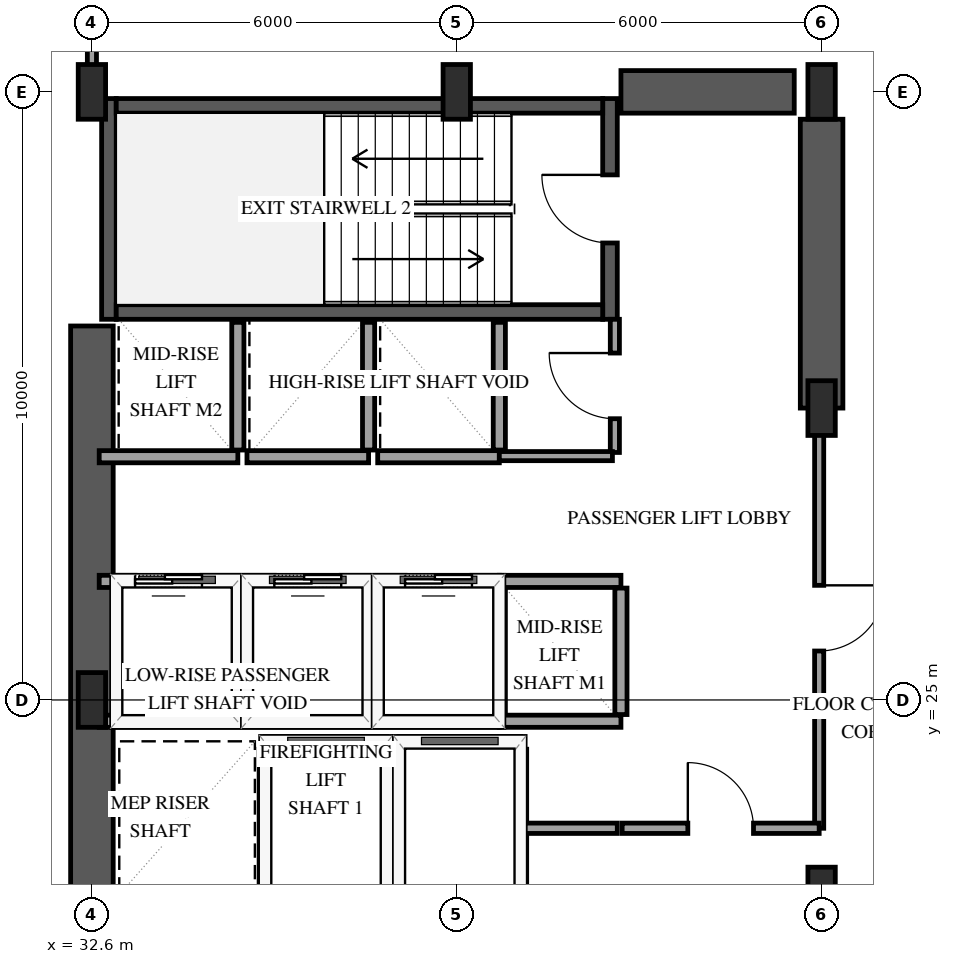
"""IFC4 building model, lengths in metres.
Left out: names, types, materials, properties, quantities, classifications, styles, units other than length and angle.
Written with IfcOpenShell. Run it as: python <this file> out.ifc"""

import sys

from ifc_helpers import new_model, si_unit, direction, frame, frame_2d, origin, origin_2d, place, context, subcontext, project, spatial, rectangle, extrude, element, fill, save


model = new_model("IFC4")
c1 = context("Model", 3, precision=1e-05, world=origin(), true_north=direction((0.0, 1.0)))
c2 = subcontext(c1, "Body", "Model", "MODEL_VIEW")
j1 = project(units=[si_unit("LENGTHUNIT", "METRE"), si_unit("PLANEANGLEUNIT", "RADIAN")], contexts=[c1])
p1 = place(None, origin())
s1 = spatial("IfcSite", under=j1, at=p1, CompositionType="ELEMENT")
p2 = place(p1, origin())
s2 = spatial("IfcBuilding", under=s1, at=p2, CompositionType="ELEMENT")
p3 = place(p2, frame((0.0, 0.0, 62.6)))
s3 = spatial("IfcBuildingStorey", under=s2, at=p3, CompositionType="ELEMENT", Elevation=62.6)
p4 = place(p3, frame((32.88, 31.26, 0.0), z_axis=(0.0, 0.0, 1.0), x_axis=(0.0, 1.0, 0.0)))
e1 = element("IfcWall", 1, at=p4, inside=s3, PredefinedType="SHEAR", context=c2, shape_type="SweptSolid", body=[
    extrude(rectangle(XDim=3.63, YDim=0.24, at=frame_2d((1.815, 0.0))), origin(), (0.0, 0.0, 1.0), 4.0),
])
p5 = place(p3, frame((41.12, 31.26, 0.0), z_axis=(0.0, 0.0, 1.0), x_axis=(0.0, 1.0, 0.0)))
e2 = element("IfcWall", 2, at=p5, inside=s3, PredefinedType="SHEAR", context=c2, shape_type="SweptSolid", body=[
    extrude(rectangle(XDim=3.63, YDim=0.24, at=frame_2d((1.815, 0.0))), origin(), (0.0, 0.0, 1.0), 4.0),
])
p6 = place(p5, frame((1.255, 0.0, 0.0)))
e3 = element("IfcOpeningElement", 3, at=p6, cuts=e2, PredefinedType="OPENING", context=c2, shape_type="SweptSolid", body=[
    extrude(rectangle(XDim=1.12, YDim=2.15, at=frame_2d((0.56, 1.075))), frame((0.0, 0.13, 0.0), z_axis=(0.0, -1.0, 0.0), x_axis=(1.0, 0.0, 0.0)), (0.0, 0.0, 1.0), 0.26),
])
for number, where, z_axis, x_axis in (
    (4, (33.0, 31.38, 0.0), (0.0, 0.0, 1.0), (1.0, 0.0, 0.0)),
    (5, (33.0, 34.77, 0.0), (0.0, 0.0, 1.0), (1.0, 0.0, 0.0)),
):
    element("IfcWall", number, at=place(p3, frame(where, z_axis=z_axis, x_axis=x_axis)), inside=s3, PredefinedType="SHEAR", context=c2, shape_type="SweptSolid", body=[
        extrude(rectangle(XDim=8.0, YDim=0.24, at=frame_2d((4.0, 0.0))), origin(), (0.0, 0.0, 1.0), 4.0),
    ])
p7 = place(p3, frame((32.6, 18.85, 0.0), z_axis=(0.0, 0.0, 1.0), x_axis=(0.0, 1.0, 0.0)))
e6 = element("IfcWall", 6, at=p7, inside=s3, PredefinedType="SHEAR", context=c2, shape_type="SweptSolid", body=[
    extrude(rectangle(XDim=12.3, YDim=0.7, at=frame_2d((6.15, 0.0))), origin(), (0.0, 0.0, 1.0), 4.0),
])
p8 = place(p3, frame((41.3, 35.0, 0.0), z_axis=(0.0, 0.0, 1.0), x_axis=(1.0, 0.0, 0.0)))
e7 = element("IfcWall", 7, at=p8, inside=s3, PredefinedType="SHEAR", context=c2, shape_type="SweptSolid", body=[
    extrude(rectangle(XDim=2.85, YDim=0.7, at=frame_2d((1.425, 0.0))), origin(), (0.0, 0.0, 1.0), 4.0),
])
p9 = place(p3, frame((44.6, 29.8, 0.0), z_axis=(0.0, 0.0, 1.0), x_axis=(0.0, 1.0, 0.0)))
e8 = element("IfcWall", 8, at=p9, inside=s3, PredefinedType="SHEAR", context=c2, shape_type="SweptSolid", body=[
    extrude(rectangle(XDim=4.75, YDim=0.7, at=frame_2d((2.375, 0.0))), origin(), (0.0, 0.0, 1.0), 4.0),
])
for number, where, z_axis, x_axis in (
    (9, (32.6, 25.0, 0.0), (0.0, 0.0, 1.0), (1.0, 0.0, 0.0)),
    (10, (32.6, 35.0, 0.0), (0.0, 0.0, 1.0), (1.0, 0.0, 0.0)),
    (11, (38.6, 35.0, 0.0), (0.0, 0.0, 1.0), (1.0, 0.0, 0.0)),
    (12, (44.6, 21.8, 0.0), (0.0, 0.0, 1.0), (1.0, 0.0, 0.0)),
    (13, (44.6, 29.8, 0.0), (0.0, 0.0, 1.0), (1.0, 0.0, 0.0)),
    (14, (44.6, 35.0, 0.0), (0.0, 0.0, 1.0), (1.0, 0.0, 0.0)),
):
    element("IfcColumn", number, at=place(p3, frame(where, z_axis=z_axis, x_axis=x_axis)), inside=s3, PredefinedType="PILASTER", context=c2, shape_type="SweptSolid", body=[
        extrude(rectangle(XDim=0.45, YDim=0.9, at=origin_2d()), origin(), (0.0, 0.0, 1.0), 4.0),
    ])
p10 = place(p3, frame((35.45, 24.3, 0.0), z_axis=(0.0, 0.0, 1.0), x_axis=(1.0, 0.0, 0.0)))
e15 = element("IfcWall", 15, at=p10, inside=s3, PredefinedType="SOLIDWALL", context=c2, shape_type="SweptSolid", body=[
    extrude(rectangle(XDim=2.0, YDim=0.2, at=frame_2d((1.0, 0.0))), origin(), (0.0, 0.0, 1.0), 3.7),
])
for number, where, z_axis, x_axis in (
    (16, (35.45, 21.81, 0.0), (0.0, 0.0, 1.0), (0.0, 1.0, 0.0)),
    (17, (37.45, 21.81, 0.0), (0.0, 0.0, 1.0), (0.0, 1.0, 0.0)),
):
    element("IfcWall", number, at=place(p3, frame(where, z_axis=z_axis, x_axis=x_axis)), inside=s3, PredefinedType="SOLIDWALL", context=c2, shape_type="SweptSolid", body=[
        extrude(rectangle(XDim=2.38, YDim=0.2, at=frame_2d((1.19, 0.0))), origin(), (0.0, 0.0, 1.0), 3.7),
    ])
p11 = place(p3, frame((37.65, 24.3, 0.0), z_axis=(0.0, 0.0, 1.0), x_axis=(1.0, 0.0, 0.0)))
e18 = element("IfcWall", 18, at=p11, inside=s3, PredefinedType="SOLIDWALL", context=c2, shape_type="SweptSolid", body=[
    extrude(rectangle(XDim=2.0, YDim=0.2, at=frame_2d((1.0, 0.0))), origin(), (0.0, 0.0, 1.0), 3.7),
])
p12 = place(p3, frame((39.65, 21.81, 0.0), z_axis=(0.0, 0.0, 1.0), x_axis=(0.0, 1.0, 0.0)))
e19 = element("IfcWall", 19, at=p12, inside=s3, PredefinedType="SOLIDWALL", context=c2, shape_type="SweptSolid", body=[
    extrude(rectangle(XDim=2.38, YDim=0.2, at=frame_2d((1.19, 0.0))), origin(), (0.0, 0.0, 1.0), 3.7),
])
p13 = place(p3, frame((32.72, 24.65, 0.0), z_axis=(0.0, 0.0, 1.0), x_axis=(1.0, 0.0, 0.0)))
e20 = element("IfcWall", 20, at=p13, inside=s3, PredefinedType="SOLIDWALL", context=c2, shape_type="SweptSolid", body=[
    extrude(rectangle(XDim=2.28, YDim=0.2, at=frame_2d((1.14, 0.0))), origin(), (0.0, 0.0, 1.0), 3.7),
])
p14 = place(p3, frame((32.72, 26.95, 0.0), z_axis=(0.0, 0.0, 1.0), x_axis=(1.0, 0.0, 0.0)))
e21 = element("IfcWall", 21, at=p14, inside=s3, PredefinedType="SOLIDWALL", context=c2, shape_type="SweptSolid", body=[
    extrude(rectangle(XDim=2.28, YDim=0.2, at=frame_2d((1.14, 0.0))), origin(), (0.0, 0.0, 1.0), 3.7),
])
p15 = place(p14, frame((0.59, 0.0, 0.0)))
e22 = element("IfcOpeningElement", 22, at=p15, cuts=e21, PredefinedType="OPENING", context=c2, shape_type="SweptSolid", body=[
    extrude(rectangle(XDim=1.1, YDim=2.15, at=frame_2d((0.55, 1.075))), frame((0.0, 0.11, 0.0), z_axis=(0.0, -1.0, 0.0), x_axis=(1.0, 0.0, 0.0)), (0.0, 0.0, 1.0), 0.22),
])
p16 = place(p3, frame((35.0, 24.76, 0.0), z_axis=(0.0, 0.0, 1.0), x_axis=(0.0, 1.0, 0.0)))
e23 = element("IfcWall", 23, at=p16, inside=s3, PredefinedType="SOLIDWALL", context=c2, shape_type="SweptSolid", body=[
    extrude(rectangle(XDim=2.08, YDim=0.2, at=frame_2d((1.04, 0.0))), origin(), (0.0, 0.0, 1.0), 3.7),
])
p17 = place(p3, frame((35.15, 24.65, 0.0), z_axis=(0.0, 0.0, 1.0), x_axis=(1.0, 0.0, 0.0)))
e24 = element("IfcWall", 24, at=p17, inside=s3, PredefinedType="SOLIDWALL", context=c2, shape_type="SweptSolid", body=[
    extrude(rectangle(XDim=2.0, YDim=0.2, at=frame_2d((1.0, 0.0))), origin(), (0.0, 0.0, 1.0), 3.7),
])
p18 = place(p3, frame((35.15, 26.95, 0.0), z_axis=(0.0, 0.0, 1.0), x_axis=(1.0, 0.0, 0.0)))
e25 = element("IfcWall", 25, at=p18, inside=s3, PredefinedType="SOLIDWALL", context=c2, shape_type="SweptSolid", body=[
    extrude(rectangle(XDim=2.0, YDim=0.2, at=frame_2d((1.0, 0.0))), origin(), (0.0, 0.0, 1.0), 3.7),
])
p19 = place(p18, frame((0.45, 0.0, 0.0)))
e26 = element("IfcOpeningElement", 26, at=p19, cuts=e25, PredefinedType="OPENING", context=c2, shape_type="SweptSolid", body=[
    extrude(rectangle(XDim=1.1, YDim=2.15, at=frame_2d((0.55, 1.075))), frame((0.0, 0.11, 0.0), z_axis=(0.0, -1.0, 0.0), x_axis=(1.0, 0.0, 0.0)), (0.0, 0.0, 1.0), 0.22),
])
p20 = place(p3, frame((37.15, 24.76, 0.0), z_axis=(0.0, 0.0, 1.0), x_axis=(0.0, 1.0, 0.0)))
e27 = element("IfcWall", 27, at=p20, inside=s3, PredefinedType="SOLIDWALL", context=c2, shape_type="SweptSolid", body=[
    extrude(rectangle(XDim=2.08, YDim=0.2, at=frame_2d((1.04, 0.0))), origin(), (0.0, 0.0, 1.0), 3.7),
])
p21 = place(p3, frame((37.3, 24.65, 0.0), z_axis=(0.0, 0.0, 1.0), x_axis=(1.0, 0.0, 0.0)))
e28 = element("IfcWall", 28, at=p21, inside=s3, PredefinedType="SOLIDWALL", context=c2, shape_type="SweptSolid", body=[
    extrude(rectangle(XDim=2.0, YDim=0.2, at=frame_2d((1.0, 0.0))), origin(), (0.0, 0.0, 1.0), 3.7),
])
p22 = place(p3, frame((37.3, 26.95, 0.0), z_axis=(0.0, 0.0, 1.0), x_axis=(1.0, 0.0, 0.0)))
e29 = element("IfcWall", 29, at=p22, inside=s3, PredefinedType="SOLIDWALL", context=c2, shape_type="SweptSolid", body=[
    extrude(rectangle(XDim=2.0, YDim=0.2, at=frame_2d((1.0, 0.0))), origin(), (0.0, 0.0, 1.0), 3.7),
])
p23 = place(p22, frame((0.45, 0.0, 0.0)))
e30 = element("IfcOpeningElement", 30, at=p23, cuts=e29, PredefinedType="OPENING", context=c2, shape_type="SweptSolid", body=[
    extrude(rectangle(XDim=1.1, YDim=2.15, at=frame_2d((0.55, 1.075))), frame((0.0, 0.11, 0.0), z_axis=(0.0, -1.0, 0.0), x_axis=(1.0, 0.0, 0.0)), (0.0, 0.0, 1.0), 0.22),
])
p24 = place(p3, frame((39.3, 24.76, 0.0), z_axis=(0.0, 0.0, 1.0), x_axis=(0.0, 1.0, 0.0)))
e31 = element("IfcWall", 31, at=p24, inside=s3, PredefinedType="SOLIDWALL", context=c2, shape_type="SweptSolid", body=[
    extrude(rectangle(XDim=2.08, YDim=0.2, at=frame_2d((1.04, 0.0))), origin(), (0.0, 0.0, 1.0), 3.7),
])
for number, where, z_axis, x_axis in (
    (32, (39.3, 24.65, 0.0), (0.0, 0.0, 1.0), (1.0, 0.0, 0.0)),
    (33, (39.3, 26.95, 0.0), (0.0, 0.0, 1.0), (1.0, 0.0, 0.0)),
):
    element("IfcWall", number, at=place(p3, frame(where, z_axis=z_axis, x_axis=x_axis)), inside=s3, PredefinedType="SOLIDWALL", context=c2, shape_type="SweptSolid", body=[
        extrude(rectangle(XDim=2.0, YDim=0.2, at=frame_2d((1.0, 0.0))), origin(), (0.0, 0.0, 1.0), 3.7),
    ])
p25 = place(p3, frame((41.3, 24.76, 0.0), z_axis=(0.0, 0.0, 1.0), x_axis=(0.0, 1.0, 0.0)))
e34 = element("IfcWall", 34, at=p25, inside=s3, PredefinedType="SOLIDWALL", context=c2, shape_type="SweptSolid", body=[
    extrude(rectangle(XDim=2.08, YDim=0.2, at=frame_2d((1.04, 0.0))), origin(), (0.0, 0.0, 1.0), 3.7),
])
p26 = place(p3, frame((32.72, 29.0, 0.0), z_axis=(0.0, 0.0, 1.0), x_axis=(1.0, 0.0, 0.0)))
e35 = element("IfcWall", 35, at=p26, inside=s3, PredefinedType="SOLIDWALL", context=c2, shape_type="SweptSolid", body=[
    extrude(rectangle(XDim=2.28, YDim=0.2, at=frame_2d((1.14, 0.0))), origin(), (0.0, 0.0, 1.0), 3.7),
])
p27 = place(p3, frame((35.0, 29.11, 0.0), z_axis=(0.0, 0.0, 1.0), x_axis=(0.0, 1.0, 0.0)))
e36 = element("IfcWall", 36, at=p27, inside=s3, PredefinedType="SOLIDWALL", context=c2, shape_type="SweptSolid", body=[
    extrude(rectangle(XDim=2.1, YDim=0.2, at=frame_2d((1.05, 0.0))), origin(), (0.0, 0.0, 1.0), 3.7),
])
p28 = place(p3, frame((35.15, 29.0, 0.0), z_axis=(0.0, 0.0, 1.0), x_axis=(1.0, 0.0, 0.0)))
e37 = element("IfcWall", 37, at=p28, inside=s3, PredefinedType="SOLIDWALL", context=c2, shape_type="SweptSolid", body=[
    extrude(rectangle(XDim=2.0, YDim=0.2, at=frame_2d((1.0, 0.0))), origin(), (0.0, 0.0, 1.0), 3.7),
])
p29 = place(p3, frame((37.15, 29.11, 0.0), z_axis=(0.0, 0.0, 1.0), x_axis=(0.0, 1.0, 0.0)))
e38 = element("IfcWall", 38, at=p29, inside=s3, PredefinedType="SOLIDWALL", context=c2, shape_type="SweptSolid", body=[
    extrude(rectangle(XDim=2.1, YDim=0.2, at=frame_2d((1.05, 0.0))), origin(), (0.0, 0.0, 1.0), 3.7),
])
p30 = place(p3, frame((37.3, 29.0, 0.0), z_axis=(0.0, 0.0, 1.0), x_axis=(1.0, 0.0, 0.0)))
e39 = element("IfcWall", 39, at=p30, inside=s3, PredefinedType="SOLIDWALL", context=c2, shape_type="SweptSolid", body=[
    extrude(rectangle(XDim=2.0, YDim=0.2, at=frame_2d((1.0, 0.0))), origin(), (0.0, 0.0, 1.0), 3.7),
])
p31 = place(p3, frame((39.3, 29.11, 0.0), z_axis=(0.0, 0.0, 1.0), x_axis=(0.0, 1.0, 0.0)))
e40 = element("IfcWall", 40, at=p31, inside=s3, PredefinedType="SOLIDWALL", context=c2, shape_type="SweptSolid", body=[
    extrude(rectangle(XDim=2.1, YDim=0.2, at=frame_2d((1.05, 0.0))), origin(), (0.0, 0.0, 1.0), 3.7),
])
p32 = place(p3, frame((44.56, 29.8, 0.0), z_axis=(0.0, 0.0, 1.0), x_axis=(0.0, -1.0, 0.0)))
e41 = element("IfcWall", 41, at=p32, inside=s3, PredefinedType="PARTITIONING", context=c2, shape_type="SweptSolid", body=[
    extrude(rectangle(XDim=6.91, YDim=0.15, at=frame_2d((3.455, 0.0))), origin(), (0.0, 0.0, 1.0), 2.74),
])
p33 = place(p32, frame((2.915, 0.0, 0.0)))
e42 = element("IfcOpeningElement", 42, at=p33, cuts=e41, PredefinedType="OPENING", context=c2, shape_type="SweptSolid", body=[
    extrude(rectangle(XDim=1.08, YDim=2.15, at=frame_2d((0.54, 1.075))), frame((0.0, 0.085, 0.0), z_axis=(0.0, -1.0, 0.0), x_axis=(1.0, 0.0, 0.0)), (0.0, 0.0, 1.0), 0.17),
])
p34 = place(p3, frame((41.32, 22.89, 0.0), z_axis=(0.0, 0.0, 1.0), x_axis=(1.0, 0.0, 0.0)))
e43 = element("IfcWall", 43, at=p34, inside=s3, PredefinedType="PARTITIONING", context=c2, shape_type="SweptSolid", body=[
    extrude(rectangle(XDim=3.24, YDim=0.17, at=frame_2d((1.62, 0.0))), origin(), (0.0, 0.0, 1.0), 3.7),
])
p35 = place(p34, frame((1.08, 0.0, 0.0)))
e44 = element("IfcOpeningElement", 44, at=p35, cuts=e43, PredefinedType="OPENING", context=c2, shape_type="SweptSolid", body=[
    extrude(rectangle(XDim=1.08, YDim=2.15, at=frame_2d((0.54, 1.075))), frame((0.0, 0.095, 0.0), z_axis=(0.0, -1.0, 0.0), x_axis=(1.0, 0.0, 0.0)), (0.0, 0.0, 1.0), 0.19),
])
p36 = place(p3, frame((41.2, 29.07, 0.0), z_axis=(0.0, 0.0, 1.0), x_axis=(0.0, 1.0, 0.0)))
e45 = element("IfcWall", 45, at=p36, inside=s3, PredefinedType="PARTITIONING", context=c2, shape_type="SweptSolid", body=[
    extrude(rectangle(XDim=2.19, YDim=0.15, at=frame_2d((1.095, 0.0))), origin(), (0.0, 0.0, 1.0), 3.7),
])
p37 = place(p36, frame((0.555, 0.0, 0.0)))
e46 = element("IfcOpeningElement", 46, at=p37, cuts=e45, PredefinedType="OPENING", context=c2, shape_type="SweptSolid", body=[
    extrude(rectangle(XDim=1.08, YDim=2.15, at=frame_2d((0.54, 1.075))), frame((0.0, 0.085, 0.0), z_axis=(0.0, -1.0, 0.0), x_axis=(1.0, 0.0, 0.0)), (0.0, 0.0, 1.0), 0.17),
])
p38 = place(p3, frame((32.6, 35.07, 0.0), z_axis=(0.0, 0.0, 1.0), x_axis=(0.0, 1.0, 0.0)))
e47 = element("IfcWall", 47, at=p38, inside=s3, PredefinedType="PARTITIONING", context=c2, shape_type="SweptSolid", body=[
    extrude(rectangle(XDim=1.91, YDim=0.15, at=frame_2d((0.955, 0.0))), origin(), (0.0, 0.0, 1.0), 3.7),
])
p39 = place(p3, frame((39.3, 29.01, 0.0), z_axis=(0.0, 0.0, 1.0), x_axis=(1.0, 0.0, 0.0)))
e48 = element("IfcWall", 48, at=p39, inside=s3, PredefinedType="PARTITIONING", context=c2, shape_type="SweptSolid", body=[
    extrude(rectangle(XDim=1.86, YDim=0.15, at=frame_2d((0.93, 0.0))), origin(), (0.0, 0.0, 1.0), 3.7),
])
p40 = place(p3, frame((39.72, 22.89, 0.0), z_axis=(0.0, 0.0, 1.0), x_axis=(1.0, 0.0, 0.0)))
e49 = element("IfcWall", 49, at=p40, inside=s3, PredefinedType="PARTITIONING", context=c2, shape_type="SweptSolid", body=[
    extrude(rectangle(XDim=1.52, YDim=0.17, at=frame_2d((0.76, 0.0))), origin(), (0.0, 0.0, 1.0), 3.7),
])
p41 = place(p15, origin())
e50 = element("IfcDoor", 50, at=p41, inside=s3, OperationType="SLIDING_TO_LEFT", PredefinedType="DOOR", context=c2, shape_type="SweptSolid", body=[
    extrude(rectangle(XDim=1.1, YDim=2.15, at=frame_2d((0.55, 1.075))), frame((0.0, 0.025, 0.0), z_axis=(0.0, -1.0, 0.0), x_axis=(1.0, 0.0, 0.0)), (0.0, 0.0, 1.0), 0.05),
])
fill(e22, e50)
p42 = place(p19, origin())
e51 = element("IfcDoor", 51, at=p42, inside=s3, OperationType="SLIDING_TO_LEFT", PredefinedType="DOOR", context=c2, shape_type="SweptSolid", body=[
    extrude(rectangle(XDim=1.1, YDim=2.15, at=frame_2d((0.55, 1.075))), frame((0.0, 0.025, 0.0), z_axis=(0.0, -1.0, 0.0), x_axis=(1.0, 0.0, 0.0)), (0.0, 0.0, 1.0), 0.05),
])
fill(e26, e51)
p43 = place(p23, origin())
e52 = element("IfcDoor", 52, at=p43, inside=s3, OperationType="SLIDING_TO_LEFT", PredefinedType="DOOR", context=c2, shape_type="SweptSolid", body=[
    extrude(rectangle(XDim=1.1, YDim=2.15, at=frame_2d((0.55, 1.075))), frame((0.0, 0.025, 0.0), z_axis=(0.0, -1.0, 0.0), x_axis=(1.0, 0.0, 0.0)), (0.0, 0.0, 1.0), 0.05),
])
fill(e30, e52)
p44 = place(p6, origin())
e53 = element("IfcDoor", 53, at=p44, inside=s3, OperationType="SINGLE_SWING_RIGHT", PredefinedType="DOOR", context=c2, shape_type="SweptSolid", body=[
    extrude(rectangle(XDim=1.12, YDim=2.15, at=frame_2d((0.56, 1.075))), frame((0.0, 0.025, 0.0), z_axis=(0.0, -1.0, 0.0), x_axis=(1.0, 0.0, 0.0)), (0.0, 0.0, 1.0), 0.05),
])
fill(e3, e53)
p45 = place(p33, origin())
e54 = element("IfcDoor", 54, at=p45, inside=s3, OperationType="SINGLE_SWING_LEFT", PredefinedType="DOOR", context=c2, shape_type="SweptSolid", body=[
    extrude(rectangle(XDim=1.08, YDim=2.15, at=frame_2d((0.54, 1.075))), frame((0.0, 0.025, 0.0), z_axis=(0.0, -1.0, 0.0), x_axis=(1.0, 0.0, 0.0)), (0.0, 0.0, 1.0), 0.05),
])
fill(e42, e54)
p46 = place(p35, origin())
e55 = element("IfcDoor", 55, at=p46, inside=s3, OperationType="SINGLE_SWING_LEFT", PredefinedType="DOOR", context=c2, shape_type="SweptSolid", body=[
    extrude(rectangle(XDim=1.08, YDim=2.15, at=frame_2d((0.54, 1.075))), frame((0.0, 0.025, 0.0), z_axis=(0.0, -1.0, 0.0), x_axis=(1.0, 0.0, 0.0)), (0.0, 0.0, 1.0), 0.05),
])
fill(e44, e55)
p47 = place(p37, origin())
e56 = element("IfcDoor", 56, at=p47, inside=s3, OperationType="SINGLE_SWING_RIGHT", PredefinedType="DOOR", context=c2, shape_type="SweptSolid", body=[
    extrude(rectangle(XDim=1.08, YDim=2.15, at=frame_2d((0.54, 1.075))), frame((0.0, 0.025, 0.0), z_axis=(0.0, -1.0, 0.0), x_axis=(1.0, 0.0, 0.0)), (0.0, 0.0, 1.0), 0.05),
])
fill(e46, e56)
save(model, sys.argv[1])
